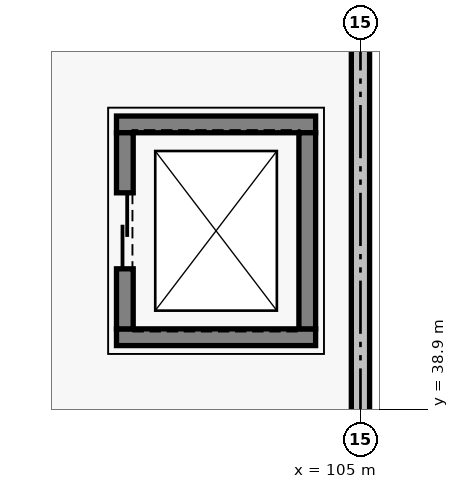
"""IFC4 building model, lengths in metres.
Left out: names, types, materials, properties, quantities, classifications, styles, units other than length and angle.
Written with IfcOpenShell. Run it as: python <this file> out.ifc"""

import sys

from ifc_helpers import new_model, si_unit, direction, frame, frame_2d, origin, place, context, subcontext, project, spatial, rectangle, extrude, element, fill, save


model = new_model("IFC4")
c1 = context("Model", 3, precision=1e-05, world=origin(), true_north=direction((0.0, 1.0)))
c2 = subcontext(c1, "Body", "Model", "MODEL_VIEW")
j1 = project(units=[si_unit("LENGTHUNIT", "METRE"), si_unit("PLANEANGLEUNIT", "RADIAN")], contexts=[c1])
p1 = place(None, origin())
s1 = spatial("IfcSite", under=j1, at=p1, CompositionType="ELEMENT")
p2 = place(p1, origin())
s2 = spatial("IfcBuilding", under=s1, at=p2, CompositionType="ELEMENT")
p3 = place(p2, frame((0.0, 0.0, -4.8)))
s3 = spatial("IfcBuildingStorey", under=s2, at=p3, CompositionType="ELEMENT", Elevation=-4.8)
for number, where, z_axis, x_axis in (
    (1, (101.79, 39.85, 0.0), (0.0, 0.0, 1.0), (1.0, 0.0, 0.0)),
    (2, (101.79, 42.65, 0.0), (0.0, 0.0, 1.0), (1.0, 0.0, 0.0)),
):
    element("IfcWall", number, at=place(p3, frame(where, z_axis=z_axis, x_axis=x_axis)), inside=s3, PredefinedType="SOLIDWALL", context=c2, shape_type="SweptSolid", body=[
        extrude(rectangle(XDim=2.62, YDim=0.22, at=frame_2d((1.31, 0.0))), origin(), (0.0, 0.0, 1.0), 4.5),
    ])
p4 = place(p3, frame((101.9, 39.96, 0.0), z_axis=(0.0, 0.0, 1.0), x_axis=(0.0, 1.0, 0.0)))
e3 = element("IfcWall", 3, at=p4, inside=s3, PredefinedType="SOLIDWALL", context=c2, shape_type="SweptSolid", body=[
    extrude(rectangle(XDim=2.58, YDim=0.22, at=frame_2d((1.29, 0.0))), origin(), (0.0, 0.0, 1.0), 4.5),
])
p5 = place(p4, frame((0.79, 0.0, 0.0)))
e4 = element("IfcOpeningElement", 4, at=p5, cuts=e3, PredefinedType="OPENING", context=c2, shape_type="SweptSolid", body=[
    extrude(rectangle(XDim=1.0, YDim=2.15, at=frame_2d((0.5, 1.075))), frame((0.0, 0.12, 0.0), z_axis=(0.0, -1.0, 0.0), x_axis=(1.0, 0.0, 0.0)), (0.0, 0.0, 1.0), 0.24),
])
p6 = place(p3, frame((104.3, 39.96, 0.0), z_axis=(0.0, 0.0, 1.0), x_axis=(0.0, 1.0, 0.0)))
e5 = element("IfcWall", 5, at=p6, inside=s3, PredefinedType="SOLIDWALL", context=c2, shape_type="SweptSolid", body=[
    extrude(rectangle(XDim=2.58, YDim=0.22, at=frame_2d((1.29, 0.0))), origin(), (0.0, 0.0, 1.0), 4.5),
])
p7 = place(p3, frame((105.0, 38.014, 0.0), z_axis=(0.0, 0.0, 1.0), x_axis=(0.0, 1.0, 0.0)))
e6 = element("IfcWall", 6, at=p7, inside=s3, PredefinedType="PARTITIONING", context=c2, shape_type="SweptSolid", body=[
    extrude(rectangle(XDim=6.472, YDim=0.24, at=frame_2d((3.236, 0.0))), origin(), (0.0, 0.0, 1.0), 3.52),
])
p8 = place(p5, origin())
e7 = element("IfcDoor", 7, at=p8, inside=s3, OperationType="SLIDING_TO_LEFT", PredefinedType="DOOR", context=c2, shape_type="SweptSolid", body=[
    extrude(rectangle(XDim=1.0, YDim=2.15, at=frame_2d((0.5, 1.075))), frame((0.0, 0.025, 0.0), z_axis=(0.0, -1.0, 0.0), x_axis=(1.0, 0.0, 0.0)), (0.0, 0.0, 1.0), 0.05),
])
fill(e4, e7)
save(model, sys.argv[1])
